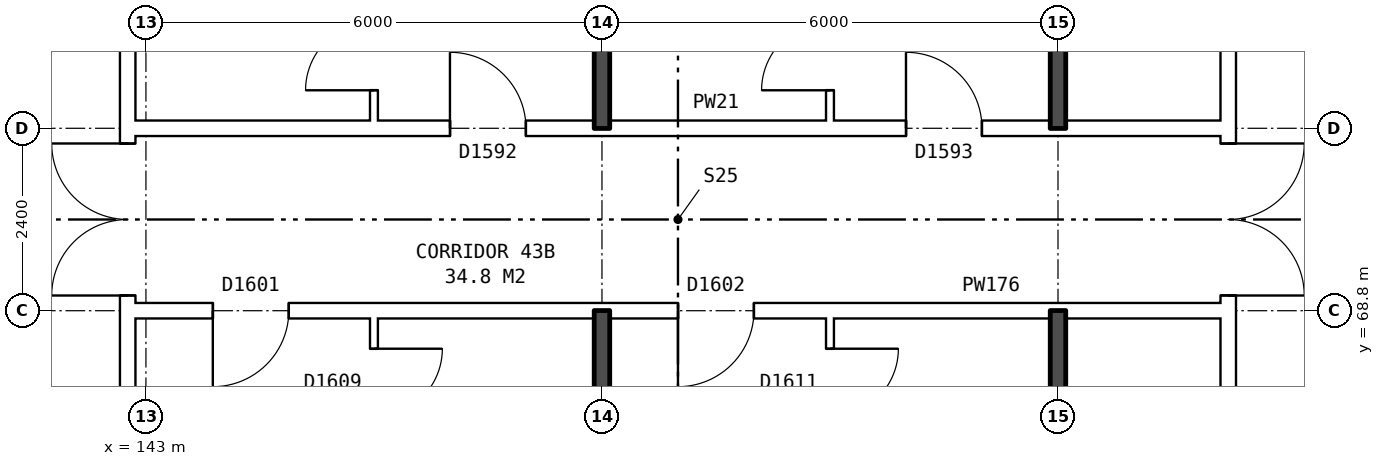
"""IFC4 building model, lengths in metres.
Left out: names, types, materials, properties, quantities, classifications, styles, units other than length and angle.
Written with IfcOpenShell. Run it as: python <this file> out.ifc"""

import sys

from ifc_helpers import new_model, si_unit, direction, frame, frame_2d, origin, place, context, subcontext, project, spatial, rectangle, extrude, element, fill, save


model = new_model("IFC4")
c1 = context("Model", 3, precision=1e-05, world=origin(), true_north=direction((0.0, 1.0)))
c2 = subcontext(c1, "Body", "Model", "MODEL_VIEW")
j1 = project(units=[si_unit("LENGTHUNIT", "METRE"), si_unit("PLANEANGLEUNIT", "RADIAN")], contexts=[c1])
p1 = place(None, origin())
s1 = spatial("IfcSite", under=j1, at=p1, CompositionType="ELEMENT")
p2 = place(p1, origin())
s2 = spatial("IfcBuilding", under=s1, at=p2, CompositionType="ELEMENT")
p3 = place(p2, frame((0.0, 0.0, 154.7)))
s3 = spatial("IfcBuildingStorey", under=s2, at=p3, CompositionType="ELEMENT", Elevation=154.7)
p4 = place(p3, frame((142.76, 63.9, 0.0), z_axis=(0.0, 0.0, 1.0), x_axis=(0.0, 1.0, 0.0)))
e1 = element("IfcWall", 1, at=p4, inside=s3, PredefinedType="PARTITIONING", context=c2, shape_type="SweptSolid", body=[
    extrude(rectangle(XDim=12.2, YDim=0.2, at=frame_2d((6.1, 0.0))), origin(), (0.0, 0.0, 1.0), 2.85),
])
p5 = place(p4, frame((5.1, 0.0, 0.0)))
e2 = element("IfcOpeningElement", 2, at=p5, cuts=e1, PredefinedType="OPENING", context=c2, shape_type="SweptSolid", body=[
    extrude(rectangle(XDim=2.0, YDim=2.1, at=frame_2d((1.0, 1.05))), frame((0.0, 0.11, 0.0), z_axis=(0.0, -1.0, 0.0), x_axis=(1.0, 0.0, 0.0)), (0.0, 0.0, 1.0), 0.22),
])
p6 = place(p3, frame((157.24, 63.9, 0.0), z_axis=(0.0, 0.0, 1.0), x_axis=(0.0, 1.0, 0.0)))
e3 = element("IfcWall", 3, at=p6, inside=s3, PredefinedType="PARTITIONING", context=c2, shape_type="SweptSolid", body=[
    extrude(rectangle(XDim=12.2, YDim=0.2, at=frame_2d((6.1, 0.0))), origin(), (0.0, 0.0, 1.0), 2.85),
])
p7 = place(p6, frame((5.1, 0.0, 0.0)))
e4 = element("IfcOpeningElement", 4, at=p7, cuts=e3, PredefinedType="OPENING", context=c2, shape_type="SweptSolid", body=[
    extrude(rectangle(XDim=2.0, YDim=2.1, at=frame_2d((1.0, 1.05))), frame((0.0, 0.11, 0.0), z_axis=(0.0, -1.0, 0.0), x_axis=(1.0, 0.0, 0.0)), (0.0, 0.0, 1.0), 0.22),
])
p8 = place(p3, frame((142.76, 68.8, 0.0), z_axis=(0.0, 0.0, 1.0), x_axis=(1.0, 0.0, 0.0)))
e5 = element("IfcWall", 5, at=p8, inside=s3, PredefinedType="PARTITIONING", context=c2, shape_type="SweptSolid", body=[
    extrude(rectangle(XDim=14.48, YDim=0.2, at=frame_2d((7.24, 0.0))), origin(), (0.0, 0.0, 1.0), 2.85),
])
p9 = place(p8, frame((1.12, 0.0, 0.0)))
e6 = element("IfcOpeningElement", 6, at=p9, cuts=e5, PredefinedType="OPENING", context=c2, shape_type="SweptSolid", body=[
    extrude(rectangle(XDim=1.0, YDim=2.1, at=frame_2d((0.5, 1.05))), frame((0.0, 0.11, 0.0), z_axis=(0.0, -1.0, 0.0), x_axis=(1.0, 0.0, 0.0)), (0.0, 0.0, 1.0), 0.22),
])
p10 = place(p8, frame((7.24, 0.0, 0.0)))
e7 = element("IfcOpeningElement", 7, at=p10, cuts=e5, PredefinedType="OPENING", context=c2, shape_type="SweptSolid", body=[
    extrude(rectangle(XDim=1.0, YDim=2.1, at=frame_2d((0.5, 1.05))), frame((0.0, 0.11, 0.0), z_axis=(0.0, -1.0, 0.0), x_axis=(1.0, 0.0, 0.0)), (0.0, 0.0, 1.0), 0.22),
])
p11 = place(p3, frame((142.76, 71.2, 0.0), z_axis=(0.0, 0.0, 1.0), x_axis=(1.0, 0.0, 0.0)))
e8 = element("IfcWall", 8, at=p11, inside=s3, PredefinedType="PARTITIONING", context=c2, shape_type="SweptSolid", body=[
    extrude(rectangle(XDim=14.48, YDim=0.2, at=frame_2d((7.24, 0.0))), origin(), (0.0, 0.0, 1.0), 2.85),
])
p12 = place(p11, frame((4.24, 0.0, 0.0)))
e9 = element("IfcOpeningElement", 9, at=p12, cuts=e8, PredefinedType="OPENING", context=c2, shape_type="SweptSolid", body=[
    extrude(rectangle(XDim=1.0, YDim=2.1, at=frame_2d((0.5, 1.05))), frame((0.0, 0.11, 0.0), z_axis=(0.0, -1.0, 0.0), x_axis=(1.0, 0.0, 0.0)), (0.0, 0.0, 1.0), 0.22),
])
p13 = place(p11, frame((10.24, 0.0, 0.0)))
e10 = element("IfcOpeningElement", 10, at=p13, cuts=e8, PredefinedType="OPENING", context=c2, shape_type="SweptSolid", body=[
    extrude(rectangle(XDim=1.0, YDim=2.1, at=frame_2d((0.5, 1.05))), frame((0.0, 0.11, 0.0), z_axis=(0.0, -1.0, 0.0), x_axis=(1.0, 0.0, 0.0)), (0.0, 0.0, 1.0), 0.22),
])
p14 = place(p3, frame((146.0, 54.36, 0.0), z_axis=(0.0, 0.0, 1.0), x_axis=(0.0, 1.0, 0.0)))
e11 = element("IfcWall", 11, at=p14, inside=s3, PredefinedType="PARTITIONING", context=c2, shape_type="SweptSolid", body=[
    extrude(rectangle(XDim=14.34, YDim=0.1, at=frame_2d((7.17, 0.0))), origin(), (0.0, 0.0, 1.0), 2.85),
])
p15 = place(p14, frame((6.7, 0.0, 0.0)))
e12 = element("IfcOpeningElement", 12, at=p15, cuts=e11, PredefinedType="OPENING", context=c2, shape_type="SweptSolid", body=[
    extrude(rectangle(XDim=0.9, YDim=2.1, at=frame_2d((0.45, 1.05))), frame((0.0, 0.06, 0.0), z_axis=(0.0, -1.0, 0.0), x_axis=(1.0, 0.0, 0.0)), (0.0, 0.0, 1.0), 0.12),
])
p16 = place(p14, frame((13.04, 0.0, 0.0)))
e13 = element("IfcOpeningElement", 13, at=p16, cuts=e11, PredefinedType="OPENING", context=c2, shape_type="SweptSolid", body=[
    extrude(rectangle(XDim=0.9, YDim=2.1, at=frame_2d((0.45, 1.05))), frame((0.0, 0.06, 0.0), z_axis=(0.0, -1.0, 0.0), x_axis=(1.0, 0.0, 0.0)), (0.0, 0.0, 1.0), 0.12),
])
p17 = place(p3, frame((146.0, 71.3, 0.0), z_axis=(0.0, 0.0, 1.0), x_axis=(0.0, 1.0, 0.0)))
e14 = element("IfcWall", 14, at=p17, inside=s3, PredefinedType="PARTITIONING", context=c2, shape_type="SweptSolid", body=[
    extrude(rectangle(XDim=14.34, YDim=0.1, at=frame_2d((7.17, 0.0))), origin(), (0.0, 0.0, 1.0), 2.85),
])
p18 = place(p17, frame((6.74, 0.0, 0.0)))
e15 = element("IfcOpeningElement", 15, at=p18, cuts=e14, PredefinedType="OPENING", context=c2, shape_type="SweptSolid", body=[
    extrude(rectangle(XDim=0.9, YDim=2.1, at=frame_2d((0.45, 1.05))), frame((0.0, 0.06, 0.0), z_axis=(0.0, -1.0, 0.0), x_axis=(1.0, 0.0, 0.0)), (0.0, 0.0, 1.0), 0.12),
])
p19 = place(p17, frame((0.4, 0.0, 0.0)))
e16 = element("IfcOpeningElement", 16, at=p19, cuts=e14, PredefinedType="OPENING", context=c2, shape_type="SweptSolid", body=[
    extrude(rectangle(XDim=0.9, YDim=2.1, at=frame_2d((0.45, 1.05))), frame((0.0, 0.06, 0.0), z_axis=(0.0, -1.0, 0.0), x_axis=(1.0, 0.0, 0.0)), (0.0, 0.0, 1.0), 0.12),
])
for number, where, z_axis, x_axis in (
    (17, (149.0, 54.36, 0.0), (0.0, 0.0, 1.0), (0.0, 1.0, 0.0)),
    (18, (149.0, 71.2, 0.0), (0.0, 0.0, 1.0), (0.0, 1.0, 0.0)),
):
    element("IfcWall", number, at=place(p3, frame(where, z_axis=z_axis, x_axis=x_axis)), inside=s3, PredefinedType="SOLIDWALL", context=c2, shape_type="SweptSolid", body=[
        extrude(rectangle(XDim=14.44, YDim=0.2, at=frame_2d((7.22, 0.0))), origin(), (0.0, 0.0, 1.0), 2.85),
    ])
p20 = place(p3, frame((152.0, 54.36, 0.0), z_axis=(0.0, 0.0, 1.0), x_axis=(0.0, 1.0, 0.0)))
e19 = element("IfcWall", 19, at=p20, inside=s3, PredefinedType="PARTITIONING", context=c2, shape_type="SweptSolid", body=[
    extrude(rectangle(XDim=14.34, YDim=0.1, at=frame_2d((7.17, 0.0))), origin(), (0.0, 0.0, 1.0), 2.85),
])
p21 = place(p20, frame((5.5, 0.0, 0.0)))
e20 = element("IfcOpeningElement", 20, at=p21, cuts=e19, PredefinedType="OPENING", context=c2, shape_type="SweptSolid", body=[
    extrude(rectangle(XDim=0.9, YDim=2.1, at=frame_2d((0.45, 1.05))), frame((0.0, 0.06, 0.0), z_axis=(0.0, -1.0, 0.0), x_axis=(1.0, 0.0, 0.0)), (0.0, 0.0, 1.0), 0.12),
])
p22 = place(p20, frame((13.04, 0.0, 0.0)))
e21 = element("IfcOpeningElement", 21, at=p22, cuts=e19, PredefinedType="OPENING", context=c2, shape_type="SweptSolid", body=[
    extrude(rectangle(XDim=0.9, YDim=2.1, at=frame_2d((0.45, 1.05))), frame((0.0, 0.06, 0.0), z_axis=(0.0, -1.0, 0.0), x_axis=(1.0, 0.0, 0.0)), (0.0, 0.0, 1.0), 0.12),
])
p23 = place(p3, frame((152.0, 71.3, 0.0), z_axis=(0.0, 0.0, 1.0), x_axis=(0.0, 1.0, 0.0)))
e22 = element("IfcWall", 22, at=p23, inside=s3, PredefinedType="PARTITIONING", context=c2, shape_type="SweptSolid", body=[
    extrude(rectangle(XDim=14.34, YDim=0.1, at=frame_2d((7.17, 0.0))), origin(), (0.0, 0.0, 1.0), 2.85),
])
p24 = place(p23, frame((9.24, 0.0, 0.0)))
e23 = element("IfcOpeningElement", 23, at=p24, cuts=e22, PredefinedType="OPENING", context=c2, shape_type="SweptSolid", body=[
    extrude(rectangle(XDim=0.9, YDim=2.1, at=frame_2d((0.45, 1.05))), frame((0.0, 0.06, 0.0), z_axis=(0.0, -1.0, 0.0), x_axis=(1.0, 0.0, 0.0)), (0.0, 0.0, 1.0), 0.12),
])
p25 = place(p23, frame((0.4, 0.0, 0.0)))
e24 = element("IfcOpeningElement", 24, at=p25, cuts=e22, PredefinedType="OPENING", context=c2, shape_type="SweptSolid", body=[
    extrude(rectangle(XDim=0.9, YDim=2.1, at=frame_2d((0.45, 1.05))), frame((0.0, 0.06, 0.0), z_axis=(0.0, -1.0, 0.0), x_axis=(1.0, 0.0, 0.0)), (0.0, 0.0, 1.0), 0.12),
])
for number, where, z_axis, x_axis in (
    (25, (155.0, 63.8, 0.0), (0.0, 0.0, 1.0), (0.0, 1.0, 0.0)),
    (26, (155.0, 71.2, 0.0), (0.0, 0.0, 1.0), (0.0, 1.0, 0.0)),
):
    element("IfcWall", number, at=place(p3, frame(where, z_axis=z_axis, x_axis=x_axis)), inside=s3, PredefinedType="SOLIDWALL", context=c2, shape_type="SweptSolid", body=[
        extrude(rectangle(XDim=5.0, YDim=0.2, at=frame_2d((2.5, 0.0))), origin(), (0.0, 0.0, 1.0), 2.85),
    ])
p26 = place(p5, origin())
e27 = element("IfcDoor", 27, at=p26, inside=s3, OperationType="DOUBLE_DOOR_SINGLE_SWING", PredefinedType="DOOR", context=c2, shape_type="SweptSolid", body=[
    extrude(rectangle(XDim=2.0, YDim=2.1, at=frame_2d((1.0, 1.05))), frame((0.0, 0.025, 0.0), z_axis=(0.0, -1.0, 0.0), x_axis=(1.0, 0.0, 0.0)), (0.0, 0.0, 1.0), 0.05),
])
fill(e2, e27)
p27 = place(p7, frame((2.0, 0.0, 0.0), z_axis=(0.0, 0.0, 1.0), x_axis=(-1.0, 0.0, 0.0)))
e28 = element("IfcDoor", 28, at=p27, inside=s3, OperationType="DOUBLE_DOOR_SINGLE_SWING", PredefinedType="DOOR", context=c2, shape_type="SweptSolid", body=[
    extrude(rectangle(XDim=2.0, YDim=2.1, at=frame_2d((1.0, 1.05))), frame((0.0, 0.025, 0.0), z_axis=(0.0, -1.0, 0.0), x_axis=(1.0, 0.0, 0.0)), (0.0, 0.0, 1.0), 0.05),
])
fill(e4, e28)
p28 = place(p9, frame((1.0, 0.0, 0.0), z_axis=(0.0, 0.0, 1.0), x_axis=(-1.0, 0.0, 0.0)))
e29 = element("IfcDoor", 29, at=p28, inside=s3, OperationType="SINGLE_SWING_RIGHT", PredefinedType="DOOR", context=c2, shape_type="SweptSolid", body=[
    extrude(rectangle(XDim=1.0, YDim=2.1, at=frame_2d((0.5, 1.05))), frame((0.0, 0.025, 0.0), z_axis=(0.0, -1.0, 0.0), x_axis=(1.0, 0.0, 0.0)), (0.0, 0.0, 1.0), 0.05),
])
fill(e6, e29)
p29 = place(p16, frame((0.9, 0.0, 0.0), z_axis=(0.0, 0.0, 1.0), x_axis=(-1.0, 0.0, 0.0)))
e30 = element("IfcDoor", 30, at=p29, inside=s3, OperationType="SINGLE_SWING_LEFT", PredefinedType="DOOR", context=c2, shape_type="SweptSolid", body=[
    extrude(rectangle(XDim=0.9, YDim=2.1, at=frame_2d((0.45, 1.05))), frame((0.0, 0.025, 0.0), z_axis=(0.0, -1.0, 0.0), x_axis=(1.0, 0.0, 0.0)), (0.0, 0.0, 1.0), 0.05),
])
fill(e13, e30)
p30 = place(p10, frame((1.0, 0.0, 0.0), z_axis=(0.0, 0.0, 1.0), x_axis=(-1.0, 0.0, 0.0)))
e31 = element("IfcDoor", 31, at=p30, inside=s3, OperationType="SINGLE_SWING_RIGHT", PredefinedType="DOOR", context=c2, shape_type="SweptSolid", body=[
    extrude(rectangle(XDim=1.0, YDim=2.1, at=frame_2d((0.5, 1.05))), frame((0.0, 0.025, 0.0), z_axis=(0.0, -1.0, 0.0), x_axis=(1.0, 0.0, 0.0)), (0.0, 0.0, 1.0), 0.05),
])
fill(e7, e31)
p31 = place(p22, frame((0.9, 0.0, 0.0), z_axis=(0.0, 0.0, 1.0), x_axis=(-1.0, 0.0, 0.0)))
e32 = element("IfcDoor", 32, at=p31, inside=s3, OperationType="SINGLE_SWING_LEFT", PredefinedType="DOOR", context=c2, shape_type="SweptSolid", body=[
    extrude(rectangle(XDim=0.9, YDim=2.1, at=frame_2d((0.45, 1.05))), frame((0.0, 0.025, 0.0), z_axis=(0.0, -1.0, 0.0), x_axis=(1.0, 0.0, 0.0)), (0.0, 0.0, 1.0), 0.05),
])
fill(e21, e32)
p32 = place(p12, origin())
e33 = element("IfcDoor", 33, at=p32, inside=s3, OperationType="SINGLE_SWING_LEFT", PredefinedType="DOOR", context=c2, shape_type="SweptSolid", body=[
    extrude(rectangle(XDim=1.0, YDim=2.1, at=frame_2d((0.5, 1.05))), frame((0.0, 0.025, 0.0), z_axis=(0.0, -1.0, 0.0), x_axis=(1.0, 0.0, 0.0)), (0.0, 0.0, 1.0), 0.05),
])
fill(e9, e33)
p33 = place(p19, origin())
e34 = element("IfcDoor", 34, at=p33, inside=s3, OperationType="SINGLE_SWING_LEFT", PredefinedType="DOOR", context=c2, shape_type="SweptSolid", body=[
    extrude(rectangle(XDim=0.9, YDim=2.1, at=frame_2d((0.45, 1.05))), frame((0.0, 0.025, 0.0), z_axis=(0.0, -1.0, 0.0), x_axis=(1.0, 0.0, 0.0)), (0.0, 0.0, 1.0), 0.05),
])
fill(e16, e34)
p34 = place(p13, origin())
e35 = element("IfcDoor", 35, at=p34, inside=s3, OperationType="SINGLE_SWING_LEFT", PredefinedType="DOOR", context=c2, shape_type="SweptSolid", body=[
    extrude(rectangle(XDim=1.0, YDim=2.1, at=frame_2d((0.5, 1.05))), frame((0.0, 0.025, 0.0), z_axis=(0.0, -1.0, 0.0), x_axis=(1.0, 0.0, 0.0)), (0.0, 0.0, 1.0), 0.05),
])
fill(e10, e35)
p35 = place(p25, origin())
e36 = element("IfcDoor", 36, at=p35, inside=s3, OperationType="SINGLE_SWING_LEFT", PredefinedType="DOOR", context=c2, shape_type="SweptSolid", body=[
    extrude(rectangle(XDim=0.9, YDim=2.1, at=frame_2d((0.45, 1.05))), frame((0.0, 0.025, 0.0), z_axis=(0.0, -1.0, 0.0), x_axis=(1.0, 0.0, 0.0)), (0.0, 0.0, 1.0), 0.05),
])
fill(e24, e36)
save(model, sys.argv[1])
